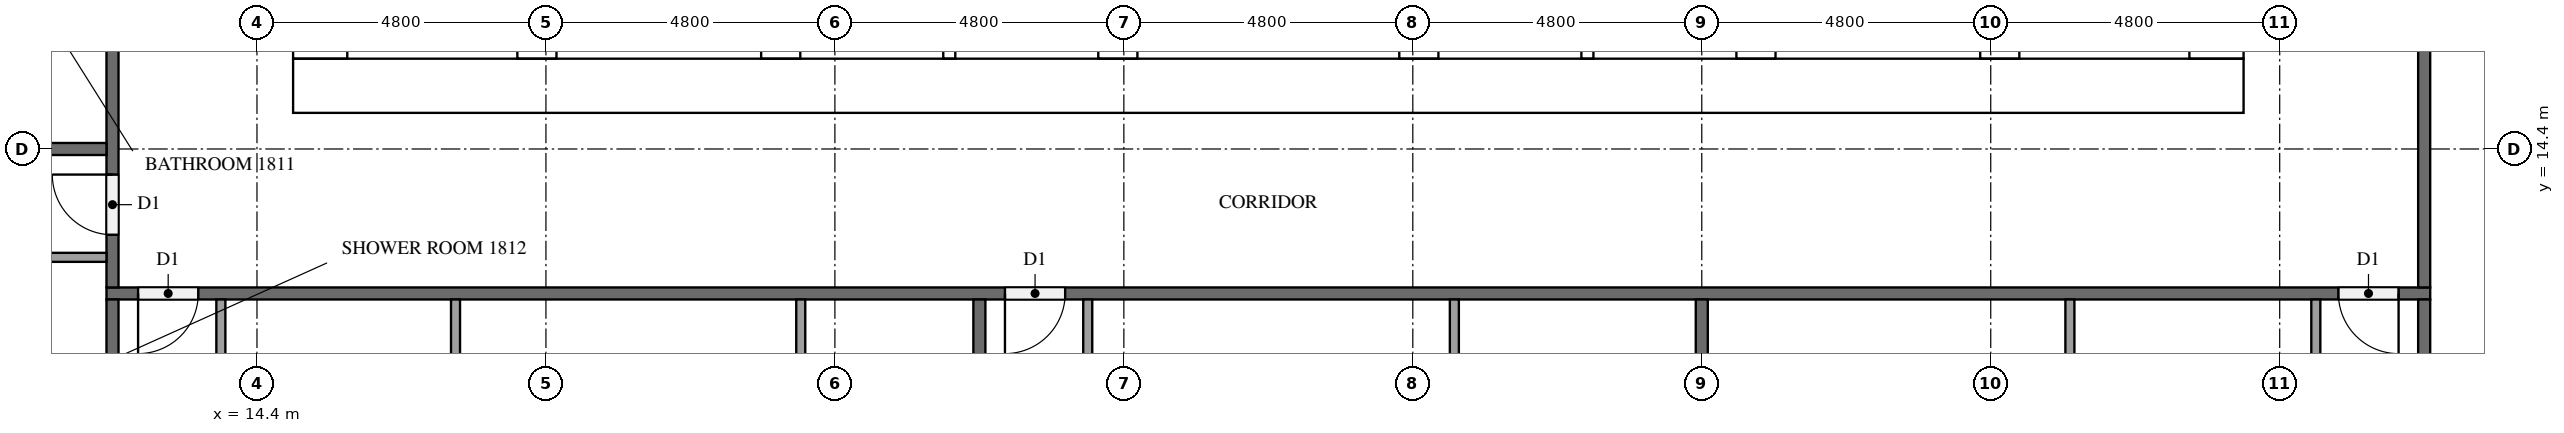
"""IFC4 building model, lengths in metres.
Left out: names, types, materials, properties, quantities, classifications, styles, units other than length and angle.
Written with IfcOpenShell. Run it as: python <this file> out.ifc"""

import sys

from ifc_helpers import new_model, si_unit, direction, frame, frame_2d, origin, place, context, subcontext, project, spatial, rectangle, extrude, element, fill, save


model = new_model("IFC4")
c1 = context("Model", 3, precision=1e-05, world=origin(), true_north=direction((0.0, 1.0)))
c2 = subcontext(c1, "Body", "Model", "MODEL_VIEW")
j1 = project(units=[si_unit("LENGTHUNIT", "METRE"), si_unit("PLANEANGLEUNIT", "RADIAN")], contexts=[c1])
p1 = place(None, origin())
s1 = spatial("IfcSite", under=j1, at=p1, CompositionType="ELEMENT")
p2 = place(p1, origin())
s2 = spatial("IfcBuilding", under=s1, at=p2, CompositionType="ELEMENT")
p3 = place(p2, frame((0.0, 0.0, 73.3)))
s3 = spatial("IfcBuildingStorey", under=s2, at=p3, CompositionType="ELEMENT", Elevation=73.3)
p4 = place(p3, frame((15.0, 15.45, 0.0), z_axis=(0.0, 0.0, 1.0), x_axis=(1.0, 0.0, 0.0)))
e1 = element("IfcWall", 1, at=p4, inside=s3, PredefinedType="SHEAR", context=c2, shape_type="SweptSolid", body=[
    extrude(rectangle(XDim=32.4, YDim=0.9, at=frame_2d((16.2, 0.0))), origin(), (0.0, 0.0, 1.0), 3.2),
])
p5 = place(p4, frame((15.3, 0.0, 0.0)))
e2 = element("IfcOpeningElement", 2, at=p5, cuts=e1, PredefinedType="OPENING", context=c2, shape_type="SweptSolid", body=[
    extrude(rectangle(XDim=1.8, YDim=2.1, at=frame_2d((0.9, 1.05))), frame((0.0, 0.46, 0.0), z_axis=(0.0, -1.0, 0.0), x_axis=(1.0, 0.0, 0.0)), (0.0, 0.0, 1.0), 0.92),
])
p6 = place(p3, frame((15.45, 15.9, 0.0), z_axis=(0.0, 0.0, 1.0), x_axis=(0.0, 1.0, 0.0)))
e3 = element("IfcWall", 3, at=p6, inside=s3, PredefinedType="SHEAR", context=c2, shape_type="SweptSolid", body=[
    extrude(rectangle(XDim=21.0, YDim=0.9, at=frame_2d((10.5, 0.0))), origin(), (0.0, 0.0, 1.0), 3.2),
])
p7 = place(p6, frame((4.86, 0.0, 0.0)))
e4 = element("IfcOpeningElement", 4, at=p7, cuts=e3, PredefinedType="OPENING", context=c2, shape_type="SweptSolid", body=[
    extrude(rectangle(XDim=1.2, YDim=2.1, at=frame_2d((0.6, 1.05))), frame((0.0, 0.46, 0.0), z_axis=(0.0, -1.0, 0.0), x_axis=(1.0, 0.0, 0.0)), (0.0, 0.0, 1.0), 0.92),
])
p8 = place(p3, frame((46.95, 15.9, 0.0), z_axis=(0.0, 0.0, 1.0), x_axis=(0.0, 1.0, 0.0)))
e5 = element("IfcWall", 5, at=p8, inside=s3, PredefinedType="SHEAR", context=c2, shape_type="SweptSolid", body=[
    extrude(rectangle(XDim=21.0, YDim=0.9, at=frame_2d((10.5, 0.0))), origin(), (0.0, 0.0, 1.0), 3.2),
])
p9 = place(p8, frame((10.2, 0.0, 0.0)))
e6 = element("IfcOpeningElement", 6, at=p9, cuts=e5, PredefinedType="OPENING", context=c2, shape_type="SweptSolid", body=[
    extrude(rectangle(XDim=1.2, YDim=2.1, at=frame_2d((0.6, 1.05))), frame((0.0, 0.46, 0.0), z_axis=(0.0, -1.0, 0.0), x_axis=(1.0, 0.0, 0.0)), (0.0, 0.0, 1.0), 0.92),
])
p10 = place(p3, frame((19.05, 15.9, 0.0), z_axis=(0.0, 0.0, 1.0), x_axis=(0.0, 1.0, 0.0)))
e7 = element("IfcWall", 7, at=p10, inside=s3, PredefinedType="SHEAR", context=c2, shape_type="SweptSolid", body=[
    extrude(rectangle(XDim=15.025, YDim=0.65, at=frame_2d((7.513, 0.0))), origin(), (0.0, 0.0, 1.0), 3.2),
])
p11 = place(p10, frame((9.55, 0.0, 0.0)))
e8 = element("IfcOpeningElement", 8, at=p11, cuts=e7, PredefinedType="OPENING", context=c2, shape_type="SweptSolid", body=[
    extrude(rectangle(XDim=1.1, YDim=2.1, at=frame_2d((0.55, 1.05))), frame((0.0, 0.335, 0.0), z_axis=(0.0, -1.0, 0.0), x_axis=(1.0, 0.0, 0.0)), (0.0, 0.0, 1.0), 0.67),
])
p12 = place(p10, frame((13.05, 0.0, 0.0)))
e9 = element("IfcOpeningElement", 9, at=p12, cuts=e7, PredefinedType="OPENING", context=c2, shape_type="SweptSolid", body=[
    extrude(rectangle(XDim=1.1, YDim=2.1, at=frame_2d((0.55, 1.05))), frame((0.0, 0.335, 0.0), z_axis=(0.0, -1.0, 0.0), x_axis=(1.0, 0.0, 0.0)), (0.0, 0.0, 1.0), 0.67),
])
p13 = place(p10, frame((0.3, 0.0, 0.0)))
e10 = element("IfcOpeningElement", 10, at=p13, cuts=e7, PredefinedType="OPENING", context=c2, shape_type="SweptSolid", body=[
    extrude(rectangle(XDim=1.2, YDim=2.1, at=frame_2d((0.6, 1.05))), frame((0.0, 0.335, 0.0), z_axis=(0.0, -1.0, 0.0), x_axis=(1.0, 0.0, 0.0)), (0.0, 0.0, 1.0), 0.67),
])
p14 = place(p3, frame((23.1, 15.9, 0.0), z_axis=(0.0, 0.0, 1.0), x_axis=(0.0, 1.0, 0.0)))
e11 = element("IfcWall", 11, at=p14, inside=s3, PredefinedType="SHEAR", context=c2, shape_type="SweptSolid", body=[
    extrude(rectangle(XDim=21.0, YDim=0.65, at=frame_2d((10.5, 0.0))), origin(), (0.0, 0.0, 1.0), 3.2),
])
p15 = place(p3, frame((39.3, 15.9, 0.0), z_axis=(0.0, 0.0, 1.0), x_axis=(0.0, 1.0, 0.0)))
e12 = element("IfcWall", 12, at=p15, inside=s3, PredefinedType="SHEAR", context=c2, shape_type="SweptSolid", body=[
    extrude(rectangle(XDim=8.35, YDim=0.65, at=frame_2d((4.175, 0.0))), origin(), (0.0, 0.0, 1.0), 3.2),
])
p16 = place(p3, frame((43.35, 15.9, 0.0), z_axis=(0.0, 0.0, 1.0), x_axis=(0.0, 1.0, 0.0)))
e13 = element("IfcWall", 13, at=p16, inside=s3, PredefinedType="SHEAR", context=c2, shape_type="SweptSolid", body=[
    extrude(rectangle(XDim=8.35, YDim=0.65, at=frame_2d((4.175, 0.0))), origin(), (0.0, 0.0, 1.0), 3.2),
])
p17 = place(p16, frame((0.3, 0.0, 0.0)))
e14 = element("IfcOpeningElement", 14, at=p17, cuts=e13, PredefinedType="OPENING", context=c2, shape_type="SweptSolid", body=[
    extrude(rectangle(XDim=1.2, YDim=2.1, at=frame_2d((0.6, 1.05))), frame((0.0, 0.335, 0.0), z_axis=(0.0, -1.0, 0.0), x_axis=(1.0, 0.0, 0.0)), (0.0, 0.0, 1.0), 0.67),
])
for number, where, z_axis, x_axis in (
    (15, (28.7, 15.9, 0.0), (0.0, 0.0, 1.0), (0.0, 1.0, 0.0)),
    (16, (33.7, 15.9, 0.0), (0.0, 0.0, 1.0), (0.0, 1.0, 0.0)),
):
    element("IfcWall", number, at=place(p3, frame(where, z_axis=z_axis, x_axis=x_axis)), inside=s3, PredefinedType="SHEAR", context=c2, shape_type="SweptSolid", body=[
        extrude(rectangle(XDim=2.525, YDim=0.65, at=frame_2d((1.263, 0.0))), origin(), (0.0, 0.0, 1.0), 3.2),
    ])
for number, where, z_axis, x_axis in (
    (17, (25.9, 15.9, 0.0), (0.0, 0.0, 1.0), (0.0, 1.0, 0.0)),
    (18, (36.5, 15.9, 0.0), (0.0, 0.0, 1.0), (0.0, 1.0, 0.0)),
):
    element("IfcWall", number, at=place(p3, frame(where, z_axis=z_axis, x_axis=x_axis)), inside=s3, PredefinedType="SOLIDWALL", context=c2, shape_type="SweptSolid", body=[
        extrude(rectangle(XDim=2.525, YDim=0.2, at=frame_2d((1.263, 0.0))), origin(), (0.0, 0.0, 1.0), 3.2),
    ])
p18 = place(p3, frame((50.5, 12.0, 0.0), z_axis=(0.0, 0.0, 1.0), x_axis=(-1.0, 0.0, 0.0)))
e19 = element("IfcWall", 19, at=p18, inside=s3, PredefinedType="PARTITIONING", context=c2, shape_type="SweptSolid", body=[
    extrude(rectangle(XDim=38.6, YDim=0.2, at=frame_2d((19.3, 0.0))), origin(), (0.0, 0.0, 1.0), 3.2),
])
p19 = place(p18, frame((37.075, 0.0, 0.0)))
e20 = element("IfcOpeningElement", 20, at=p19, cuts=e19, PredefinedType="OPENING", context=c2, shape_type="SweptSolid", body=[
    extrude(rectangle(XDim=1.0, YDim=2.1, at=frame_2d((0.5, 1.05))), frame((0.0, 0.11, 0.0), z_axis=(0.0, -1.0, 0.0), x_axis=(1.0, 0.0, 0.0)), (0.0, 0.0, 1.0), 0.22),
])
p20 = place(p18, frame((22.675, 0.0, 0.0)))
e21 = element("IfcOpeningElement", 21, at=p20, cuts=e19, PredefinedType="OPENING", context=c2, shape_type="SweptSolid", body=[
    extrude(rectangle(XDim=1.0, YDim=2.1, at=frame_2d((0.5, 1.05))), frame((0.0, 0.11, 0.0), z_axis=(0.0, -1.0, 0.0), x_axis=(1.0, 0.0, 0.0)), (0.0, 0.0, 1.0), 0.22),
])
p21 = place(p18, frame((0.525, 0.0, 0.0)))
e22 = element("IfcOpeningElement", 22, at=p21, cuts=e19, PredefinedType="OPENING", context=c2, shape_type="SweptSolid", body=[
    extrude(rectangle(XDim=1.0, YDim=2.1, at=frame_2d((0.5, 1.05))), frame((0.0, 0.11, 0.0), z_axis=(0.0, -1.0, 0.0), x_axis=(1.0, 0.0, 0.0)), (0.0, 0.0, 1.0), 0.22),
])
p22 = place(p3, frame((50.4, 40.7, 0.0), z_axis=(0.0, 0.0, 1.0), x_axis=(0.0, -1.0, 0.0)))
e23 = element("IfcWall", 23, at=p22, inside=s3, PredefinedType="PARTITIONING", context=c2, shape_type="SweptSolid", body=[
    extrude(rectangle(XDim=28.6, YDim=0.2, at=frame_2d((14.3, 0.0))), origin(), (0.0, 0.0, 1.0), 3.2),
])
p23 = place(p22, frame((21.875, 0.0, 0.0)))
e24 = element("IfcOpeningElement", 24, at=p23, cuts=e23, PredefinedType="OPENING", context=c2, shape_type="SweptSolid", body=[
    extrude(rectangle(XDim=1.1, YDim=2.1, at=frame_2d((0.55, 1.05))), frame((0.0, 0.11, 0.0), z_axis=(0.0, -1.0, 0.0), x_axis=(1.0, 0.0, 0.0)), (0.0, 0.0, 1.0), 0.22),
])
p24 = place(p22, frame((20.075, 0.0, 0.0)))
e25 = element("IfcOpeningElement", 25, at=p24, cuts=e23, PredefinedType="OPENING", context=c2, shape_type="SweptSolid", body=[
    extrude(rectangle(XDim=1.0, YDim=2.1, at=frame_2d((0.5, 1.05))), frame((0.0, 0.11, 0.0), z_axis=(0.0, -1.0, 0.0), x_axis=(1.0, 0.0, 0.0)), (0.0, 0.0, 1.0), 0.22),
])
p25 = place(p22, frame((5.675, 0.0, 0.0)))
e26 = element("IfcOpeningElement", 26, at=p25, cuts=e23, PredefinedType="OPENING", context=c2, shape_type="SweptSolid", body=[
    extrude(rectangle(XDim=1.0, YDim=2.1, at=frame_2d((0.5, 1.05))), frame((0.0, 0.11, 0.0), z_axis=(0.0, -1.0, 0.0), x_axis=(1.0, 0.0, 0.0)), (0.0, 0.0, 1.0), 0.22),
])
p26 = place(p3, frame((12.0, 12.1, 0.0), z_axis=(0.0, 0.0, 1.0), x_axis=(0.0, 1.0, 0.0)))
e27 = element("IfcWall", 27, at=p26, inside=s3, PredefinedType="PARTITIONING", context=c2, shape_type="SweptSolid", body=[
    extrude(rectangle(XDim=28.6, YDim=0.2, at=frame_2d((14.3, 0.0))), origin(), (0.0, 0.0, 1.0), 3.2),
])
p27 = place(p26, frame((14.725, 0.0, 0.0)))
e28 = element("IfcOpeningElement", 28, at=p27, cuts=e27, PredefinedType="OPENING", context=c2, shape_type="SweptSolid", body=[
    extrude(rectangle(XDim=1.0, YDim=2.1, at=frame_2d((0.5, 1.05))), frame((0.0, 0.11, 0.0), z_axis=(0.0, -1.0, 0.0), x_axis=(1.0, 0.0, 0.0)), (0.0, 0.0, 1.0), 0.22),
])
p28 = place(p26, frame((12.875, 0.0, 0.0)))
e29 = element("IfcOpeningElement", 29, at=p28, cuts=e27, PredefinedType="OPENING", context=c2, shape_type="SweptSolid", body=[
    extrude(rectangle(XDim=1.0, YDim=2.1, at=frame_2d((0.5, 1.05))), frame((0.0, 0.11, 0.0), z_axis=(0.0, -1.0, 0.0), x_axis=(1.0, 0.0, 0.0)), (0.0, 0.0, 1.0), 0.22),
])
p29 = place(p26, frame((0.875, 0.0, 0.0)))
e30 = element("IfcOpeningElement", 30, at=p29, cuts=e27, PredefinedType="OPENING", context=c2, shape_type="SweptSolid", body=[
    extrude(rectangle(XDim=1.0, YDim=2.1, at=frame_2d((0.5, 1.05))), frame((0.0, 0.11, 0.0), z_axis=(0.0, -1.0, 0.0), x_axis=(1.0, 0.0, 0.0)), (0.0, 0.0, 1.0), 0.22),
])
for number, where, z_axis, x_axis in (
    (31, (26.4, 11.9, 0.0), (0.0, 0.0, 1.0), (0.0, -1.0, 0.0)),
    (32, (12.0, 0.1, 0.0), (0.0, 0.0, 1.0), (0.0, 1.0, 0.0)),
):
    element("IfcWall", number, at=place(p3, frame(where, z_axis=z_axis, x_axis=x_axis)), inside=s3, PredefinedType="PARTITIONING", context=c2, shape_type="SweptSolid", body=[
        extrude(rectangle(XDim=11.8, YDim=0.2, at=frame_2d((5.9, 0.0))), origin(), (0.0, 0.0, 1.0), 3.2),
    ])
p30 = place(p3, frame((38.4, 11.9, 0.0), z_axis=(0.0, 0.0, 1.0), x_axis=(0.0, -1.0, 0.0)))
e33 = element("IfcWall", 33, at=p30, inside=s3, PredefinedType="PARTITIONING", context=c2, shape_type="SweptSolid", body=[
    extrude(rectangle(XDim=11.475, YDim=0.2, at=frame_2d((5.737, 0.0))), origin(), (0.0, 0.0, 1.0), 3.2),
])
p31 = place(p3, frame((50.4, 11.9, 0.0), z_axis=(0.0, 0.0, 1.0), x_axis=(0.0, -1.0, 0.0)))
e34 = element("IfcWall", 34, at=p31, inside=s3, PredefinedType="PARTITIONING", context=c2, shape_type="SweptSolid", body=[
    extrude(rectangle(XDim=11.8, YDim=0.2, at=frame_2d((5.9, 0.0))), origin(), (0.0, 0.0, 1.0), 3.2),
])
p32 = place(p3, frame((5.225, 14.4, 0.0), z_axis=(0.0, 0.0, 1.0), x_axis=(1.0, 0.0, 0.0)))
e35 = element("IfcWall", 35, at=p32, inside=s3, PredefinedType="PARTITIONING", context=c2, shape_type="SweptSolid", body=[
    extrude(rectangle(XDim=6.675, YDim=0.2, at=frame_2d((3.337, 0.0))), origin(), (0.0, 0.0, 1.0), 3.2),
])
for number, where, z_axis, x_axis in (
    (36, (17.698, 11.9, 0.0), (0.0, 0.0, 1.0), (0.0, -1.0, 0.0)),
    (37, (23.433, 11.9, 0.0), (0.0, 0.0, 1.0), (0.0, -1.0, 0.0)),
):
    element("IfcWall", number, at=place(p3, frame(where, z_axis=z_axis, x_axis=x_axis)), inside=s3, PredefinedType="PARTITIONING", context=c2, shape_type="SweptSolid", body=[
        extrude(rectangle(XDim=2.975, YDim=0.15, at=frame_2d((1.487, 0.0))), origin(), (0.0, 0.0, 1.0), 3.2),
    ])
p33 = place(p3, frame((13.8, 11.9, 0.0), z_axis=(0.0, 0.0, 1.0), x_axis=(0.0, -1.0, 0.0)))
e38 = element("IfcWall", 38, at=p33, inside=s3, PredefinedType="PARTITIONING", context=c2, shape_type="SweptSolid", body=[
    extrude(rectangle(XDim=3.125, YDim=0.15, at=frame_2d((1.562, 0.0))), origin(), (0.0, 0.0, 1.0), 3.2),
])
p34 = place(p3, frame((34.29, 11.9, 0.0), z_axis=(0.0, 0.0, 1.0), x_axis=(0.0, -1.0, 0.0)))
e39 = element("IfcWall", 39, at=p34, inside=s3, PredefinedType="PARTITIONING", context=c2, shape_type="SweptSolid", body=[
    extrude(rectangle(XDim=3.725, YDim=0.15, at=frame_2d((1.862, 0.0))), origin(), (0.0, 0.0, 1.0), 3.2),
])
p35 = place(p3, frame((28.2, 11.9, 0.0), z_axis=(0.0, 0.0, 1.0), x_axis=(0.0, -1.0, 0.0)))
e40 = element("IfcWall", 40, at=p35, inside=s3, PredefinedType="PARTITIONING", context=c2, shape_type="SweptSolid", body=[
    extrude(rectangle(XDim=3.875, YDim=0.15, at=frame_2d((1.938, 0.0))), origin(), (0.0, 0.0, 1.0), 3.2),
])
p36 = place(p3, frame((44.515, 11.9, 0.0), z_axis=(0.0, 0.0, 1.0), x_axis=(0.0, -1.0, 0.0)))
e41 = element("IfcWall", 41, at=p36, inside=s3, PredefinedType="PARTITIONING", context=c2, shape_type="SweptSolid", body=[
    extrude(rectangle(XDim=4.175, YDim=0.15, at=frame_2d((2.087, 0.0))), origin(), (0.0, 0.0, 1.0), 3.2),
])
p37 = place(p3, frame((48.6, 11.9, 0.0), z_axis=(0.0, 0.0, 1.0), x_axis=(0.0, -1.0, 0.0)))
e42 = element("IfcWall", 42, at=p37, inside=s3, PredefinedType="PARTITIONING", context=c2, shape_type="SweptSolid", body=[
    extrude(rectangle(XDim=4.325, YDim=0.15, at=frame_2d((2.163, 0.0))), origin(), (0.0, 0.0, 1.0), 3.2),
])
p38 = place(p3, frame((11.9, 12.6, 0.0), z_axis=(0.0, 0.0, 1.0), x_axis=(-1.0, 0.0, 0.0)))
e43 = element("IfcWall", 43, at=p38, inside=s3, PredefinedType="PARTITIONING", context=c2, shape_type="SweptSolid", body=[
    extrude(rectangle(XDim=2.075, YDim=0.15, at=frame_2d((1.038, 0.0))), origin(), (0.0, 0.0, 1.0), 3.2),
])
p39 = place(p5, frame((1.8, 0.0, 0.0), z_axis=(0.0, 0.0, 1.0), x_axis=(-1.0, 0.0, 0.0)))
e44 = element("IfcDoor", 44, at=p39, inside=s3, OperationType="DOUBLE_DOOR_SINGLE_SWING", PredefinedType="DOOR", context=c2, shape_type="SweptSolid", body=[
    extrude(rectangle(XDim=1.8, YDim=2.1, at=frame_2d((0.9, 1.05))), frame((0.0, 0.025, 0.0), z_axis=(0.0, -1.0, 0.0), x_axis=(1.0, 0.0, 0.0)), (0.0, 0.0, 1.0), 0.05),
])
fill(e2, e44)
p40 = place(p19, origin())
e45 = element("IfcDoor", 45, at=p40, inside=s3, OperationType="SINGLE_SWING_RIGHT", PredefinedType="DOOR", context=c2, shape_type="SweptSolid", body=[
    extrude(rectangle(XDim=1.0, YDim=2.1, at=frame_2d((0.5, 1.05))), frame((0.0, 0.025, 0.0), z_axis=(0.0, -1.0, 0.0), x_axis=(1.0, 0.0, 0.0)), (0.0, 0.0, 1.0), 0.05),
])
fill(e20, e45)
p41 = place(p20, origin())
e46 = element("IfcDoor", 46, at=p41, inside=s3, OperationType="SINGLE_SWING_RIGHT", PredefinedType="DOOR", context=c2, shape_type="SweptSolid", body=[
    extrude(rectangle(XDim=1.0, YDim=2.1, at=frame_2d((0.5, 1.05))), frame((0.0, 0.025, 0.0), z_axis=(0.0, -1.0, 0.0), x_axis=(1.0, 0.0, 0.0)), (0.0, 0.0, 1.0), 0.05),
])
fill(e21, e46)
p42 = place(p21, origin())
e47 = element("IfcDoor", 47, at=p42, inside=s3, OperationType="SINGLE_SWING_LEFT", PredefinedType="DOOR", context=c2, shape_type="SweptSolid", body=[
    extrude(rectangle(XDim=1.0, YDim=2.1, at=frame_2d((0.5, 1.05))), frame((0.0, 0.025, 0.0), z_axis=(0.0, -1.0, 0.0), x_axis=(1.0, 0.0, 0.0)), (0.0, 0.0, 1.0), 0.05),
])
fill(e22, e47)
p43 = place(p29, origin())
e48 = element("IfcDoor", 48, at=p43, inside=s3, OperationType="SINGLE_SWING_RIGHT", PredefinedType="DOOR", context=c2, shape_type="SweptSolid", body=[
    extrude(rectangle(XDim=1.0, YDim=2.1, at=frame_2d((0.5, 1.05))), frame((0.0, 0.025, 0.0), z_axis=(0.0, -1.0, 0.0), x_axis=(1.0, 0.0, 0.0)), (0.0, 0.0, 1.0), 0.05),
])
fill(e30, e48)
save(model, sys.argv[1])
